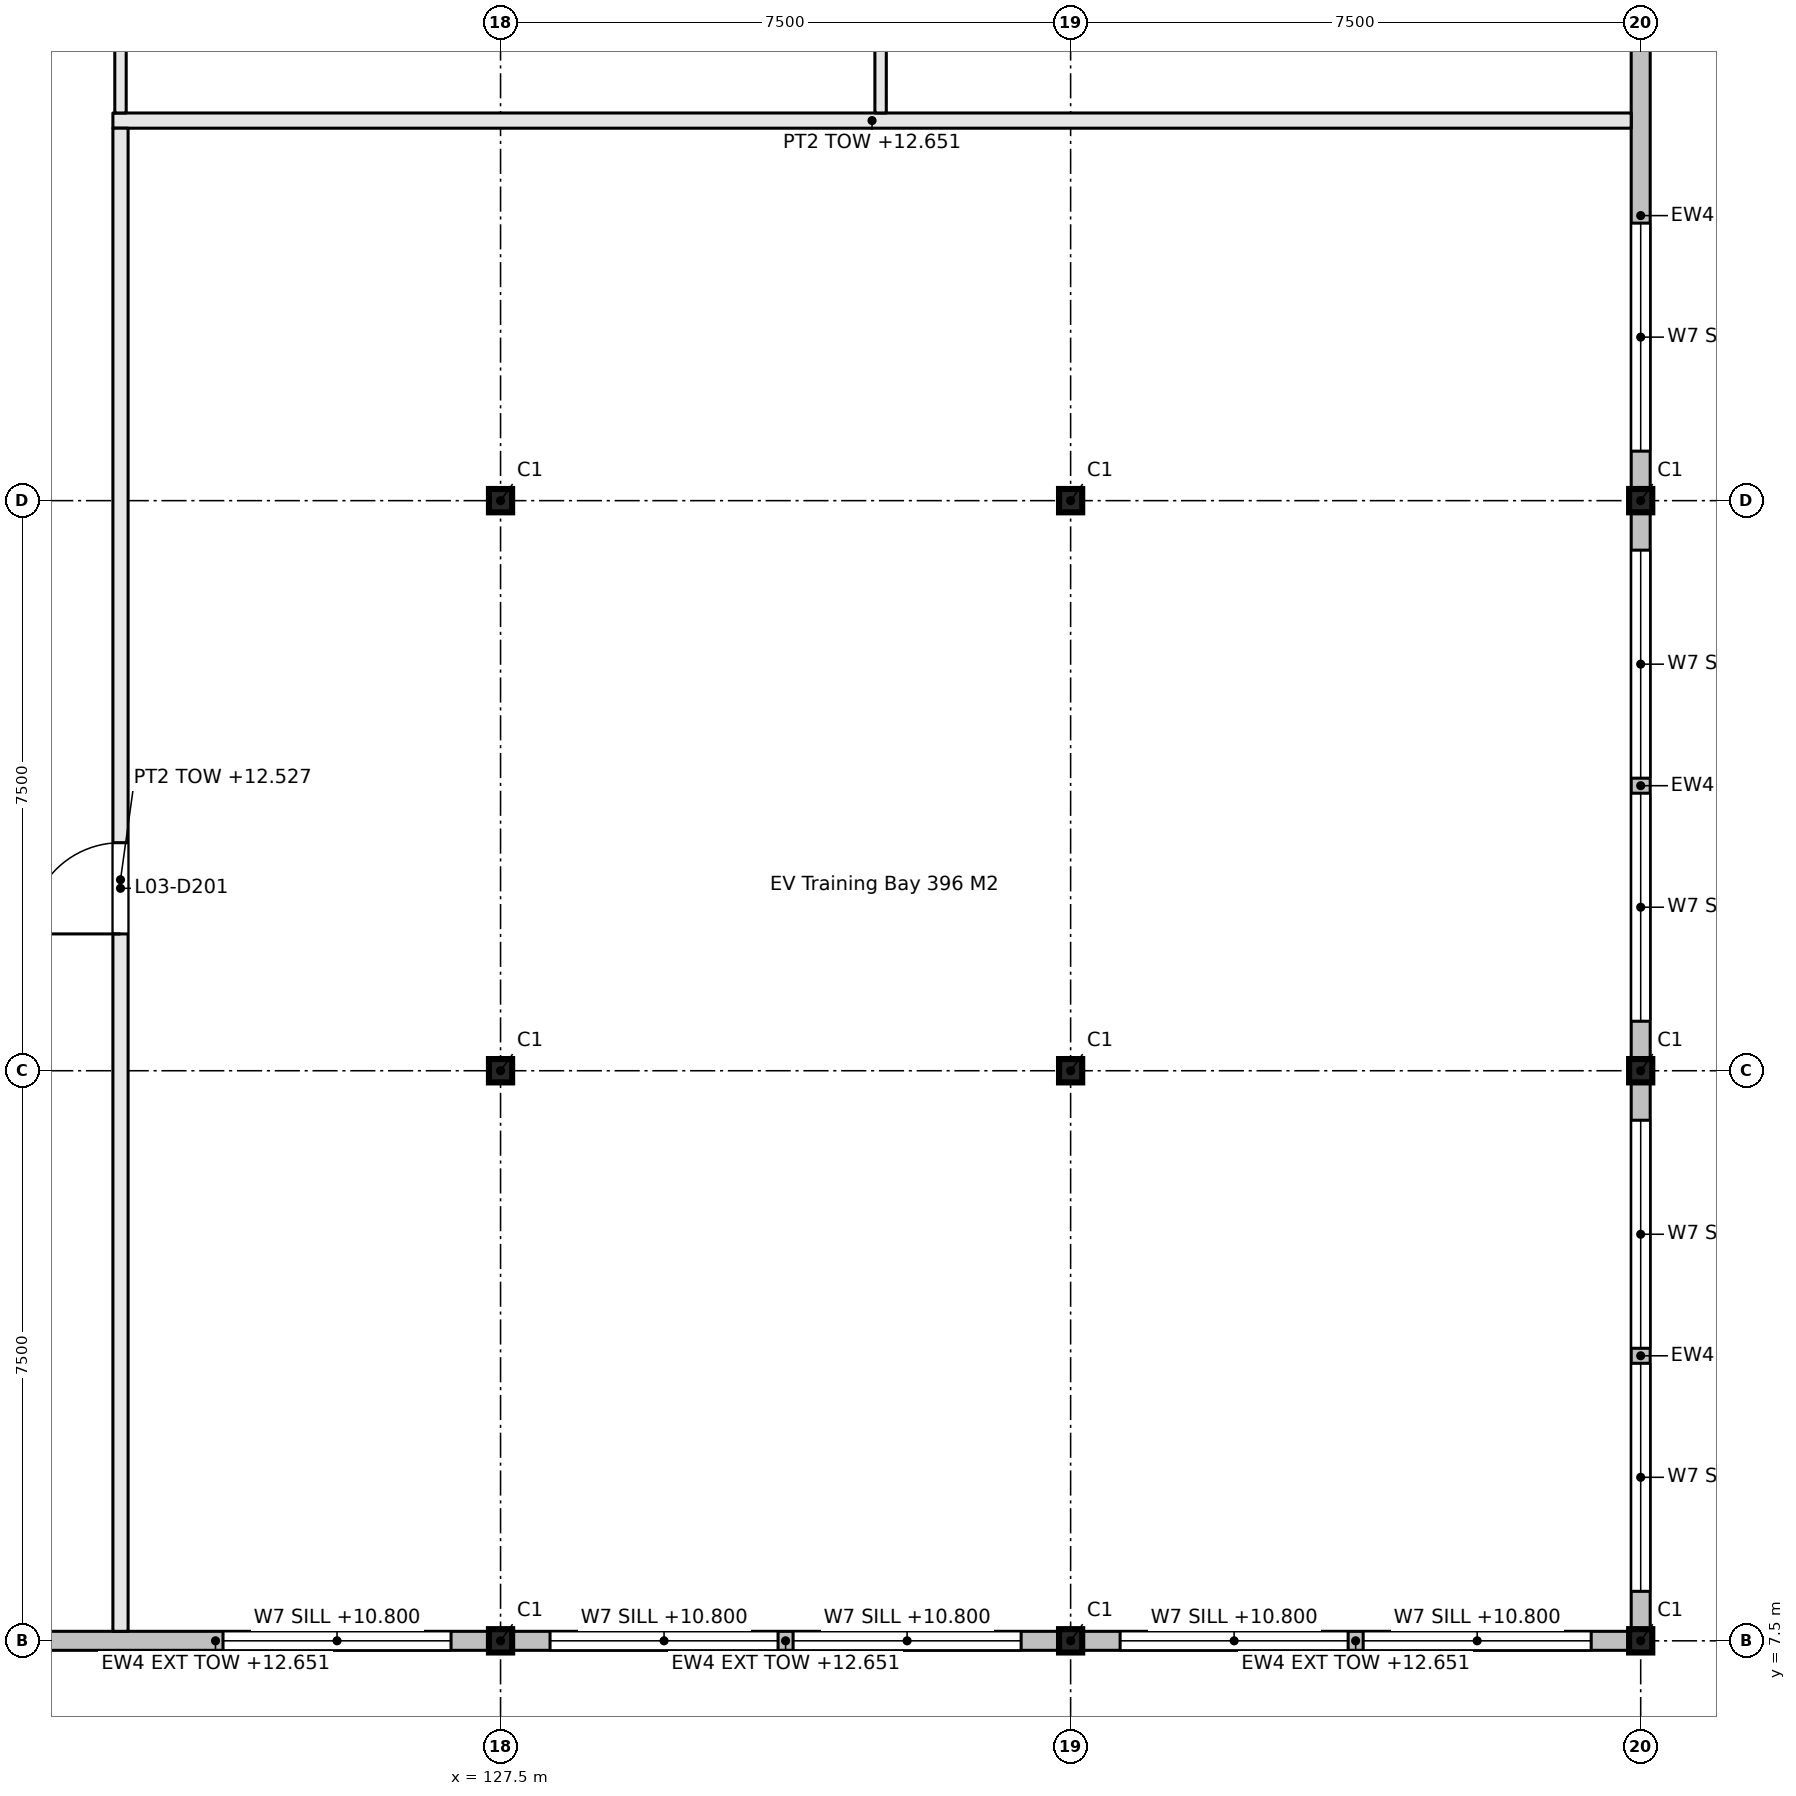
"""IFC4 building model, lengths in metres.
Left out: names, types, materials, properties, quantities, classifications, styles, units other than length and angle.
Written with IfcOpenShell. Run it as: python <this file> out.ifc"""

import sys

from ifc_helpers import new_model, si_unit, direction, frame, frame_2d, origin, origin_2d, place, context, subcontext, project, spatial, rectangle, i_section, extrude, element, fill, save


model = new_model("IFC4")
c1 = context("Model", 3, precision=1e-05, world=origin(), true_north=direction((0.0, 1.0)))
c2 = subcontext(c1, "Body", "Model", "MODEL_VIEW")
j1 = project(units=[si_unit("LENGTHUNIT", "METRE"), si_unit("PLANEANGLEUNIT", "RADIAN")], contexts=[c1])
p1 = place(None, origin())
s1 = spatial("IfcSite", under=j1, at=p1, CompositionType="ELEMENT")
p2 = place(p1, origin())
s2 = spatial("IfcBuilding", under=s1, at=p2, CompositionType="ELEMENT")
p3 = place(p2, frame((0.0, 0.0, 9.9)))
s3 = spatial("IfcBuildingStorey", under=s2, at=p3, CompositionType="ELEMENT", Elevation=9.9)
for number, where, z_axis, x_axis in (
    (1, (127.5, 7.5, 0.0), (0.0, 0.0, 1.0), (1.0, 0.0, 0.0)),
    (2, (127.5, 15.0, 0.0), (0.0, 0.0, 1.0), (1.0, 0.0, 0.0)),
    (3, (127.5, 22.5, 0.0), (0.0, 0.0, 1.0), (1.0, 0.0, 0.0)),
    (4, (135.0, 7.5, 0.0), (0.0, 0.0, 1.0), (1.0, 0.0, 0.0)),
    (5, (135.0, 15.0, 0.0), (0.0, 0.0, 1.0), (1.0, 0.0, 0.0)),
    (6, (135.0, 22.5, 0.0), (0.0, 0.0, 1.0), (1.0, 0.0, 0.0)),
    (7, (142.5, 7.5, 0.0), (0.0, 0.0, 1.0), (1.0, 0.0, 0.0)),
    (8, (142.5, 15.0, 0.0), (0.0, 0.0, 1.0), (1.0, 0.0, 0.0)),
    (9, (142.5, 22.5, 0.0), (0.0, 0.0, 1.0), (1.0, 0.0, 0.0)),
):
    element("IfcColumn", number, at=place(p3, frame(where, z_axis=z_axis, x_axis=x_axis)), inside=s3, PredefinedType="COLUMN", context=c2, shape_type="SweptSolid", body=[
        extrude(i_section(OverallWidth=0.305, OverallDepth=0.307, WebThickness=0.01, FlangeThickness=0.015, FilletRadius=0.015, at=origin_2d()), origin(), (0.0, 0.0, 1.0), 3.3),
    ])
p4 = place(p3, frame((122.4, 27.5, 0.0), z_axis=(0.0, 0.0, 1.0), x_axis=(1.0, 0.0, 0.0)))
e10 = element("IfcWall", 10, at=p4, inside=s3, PredefinedType="PARTITIONING", context=c2, shape_type="SweptSolid", body=[
    extrude(rectangle(XDim=19.975, YDim=0.2, at=frame_2d((9.988, 0.0))), origin(), (0.0, 0.0, 1.0), 2.751),
])
p5 = place(p3, frame((122.5, 7.625, 0.0), z_axis=(0.0, 0.0, 1.0), x_axis=(0.0, 1.0, 0.0)))
e11 = element("IfcWall", 11, at=p5, inside=s3, PredefinedType="PARTITIONING", context=c2, shape_type="SweptSolid", body=[
    extrude(rectangle(XDim=19.775, YDim=0.2, at=frame_2d((9.887, 0.0))), origin(), (0.0, 0.0, 1.0), 2.627),
])
p6 = place(p5, frame((9.175, 0.0, 0.0)))
e12 = element("IfcOpeningElement", 12, at=p6, cuts=e11, PredefinedType="OPENING", context=c2, shape_type="SweptSolid", body=[
    extrude(rectangle(XDim=1.2, YDim=2.1, at=frame_2d((0.6, 1.05))), frame((0.0, 0.11, 0.0), z_axis=(0.0, -1.0, 0.0), x_axis=(1.0, 0.0, 0.0)), (0.0, 0.0, 1.0), 0.22),
])
p7 = place(p3, frame((122.5, 27.6, 0.0), z_axis=(0.0, 0.0, 1.0), x_axis=(0.0, 1.0, 0.0)))
e13 = element("IfcWall", 13, at=p7, inside=s3, PredefinedType="PARTITIONING", context=c2, shape_type="SweptSolid", body=[
    extrude(rectangle(XDim=14.325, YDim=0.15, at=frame_2d((7.163, 0.0))), origin(), (0.0, 0.0, 1.0), 2.627),
])
p8 = place(p7, frame((6.55, 0.0, 0.0)))
e14 = element("IfcOpeningElement", 14, at=p8, cuts=e13, PredefinedType="OPENING", context=c2, shape_type="SweptSolid", body=[
    extrude(rectangle(XDim=1.2, YDim=2.1, at=frame_2d((0.6, 1.05))), frame((0.0, 0.085, 0.0), z_axis=(0.0, -1.0, 0.0), x_axis=(1.0, 0.0, 0.0)), (0.0, 0.0, 1.0), 0.17),
])
p9 = place(p3, frame((132.5, 27.6, 0.0), z_axis=(0.0, 0.0, 1.0), x_axis=(0.0, 1.0, 0.0)))
e15 = element("IfcWall", 15, at=p9, inside=s3, PredefinedType="PARTITIONING", context=c2, shape_type="SweptSolid", body=[
    extrude(rectangle(XDim=10.8, YDim=0.15, at=frame_2d((5.4, 0.0))), origin(), (0.0, 0.0, 1.0), 2.627),
])
p10 = place(p3, frame((120.154, 7.5, 0.0), z_axis=(0.0, 0.0, 1.0), x_axis=(1.0, 0.0, 0.0)))
e16 = element("IfcWall", 16, at=p10, inside=s3, PredefinedType="SOLIDWALL", context=c2, shape_type="SweptSolid", body=[
    extrude(rectangle(XDim=7.193, YDim=0.25, at=frame_2d((3.596, 0.0))), origin(), (0.0, 0.0, 1.0), 2.751),
])
p11 = place(p10, frame((3.695, 0.0, 0.9)))
e17 = element("IfcOpeningElement", 17, at=p11, cuts=e16, PredefinedType="OPENING", context=c2, shape_type="SweptSolid", body=[
    extrude(rectangle(XDim=3.0, YDim=1.5, at=frame_2d((1.5, 0.75))), frame((0.0, 0.135, 0.0), z_axis=(0.0, -1.0, 0.0), x_axis=(1.0, 0.0, 0.0)), (0.0, 0.0, 1.0), 0.27),
])
p12 = place(p3, frame((127.654, 7.5, 0.0), z_axis=(0.0, 0.0, 1.0), x_axis=(1.0, 0.0, 0.0)))
e18 = element("IfcWall", 18, at=p12, inside=s3, PredefinedType="SOLIDWALL", context=c2, shape_type="SweptSolid", body=[
    extrude(rectangle(XDim=7.193, YDim=0.25, at=frame_2d((3.596, 0.0))), origin(), (0.0, 0.0, 1.0), 2.751),
])
p13 = place(p12, frame((0.498, 0.0, 0.9)))
e19 = element("IfcOpeningElement", 19, at=p13, cuts=e18, PredefinedType="OPENING", context=c2, shape_type="SweptSolid", body=[
    extrude(rectangle(XDim=3.0, YDim=1.5, at=frame_2d((1.5, 0.75))), frame((0.0, 0.135, 0.0), z_axis=(0.0, -1.0, 0.0), x_axis=(1.0, 0.0, 0.0)), (0.0, 0.0, 1.0), 0.27),
])
p14 = place(p12, frame((3.695, 0.0, 0.9)))
e20 = element("IfcOpeningElement", 20, at=p14, cuts=e18, PredefinedType="OPENING", context=c2, shape_type="SweptSolid", body=[
    extrude(rectangle(XDim=3.0, YDim=1.5, at=frame_2d((1.5, 0.75))), frame((0.0, 0.135, 0.0), z_axis=(0.0, -1.0, 0.0), x_axis=(1.0, 0.0, 0.0)), (0.0, 0.0, 1.0), 0.27),
])
p15 = place(p3, frame((135.154, 7.5, 0.0), z_axis=(0.0, 0.0, 1.0), x_axis=(1.0, 0.0, 0.0)))
e21 = element("IfcWall", 21, at=p15, inside=s3, PredefinedType="SOLIDWALL", context=c2, shape_type="SweptSolid", body=[
    extrude(rectangle(XDim=7.193, YDim=0.25, at=frame_2d((3.596, 0.0))), origin(), (0.0, 0.0, 1.0), 2.751),
])
p16 = place(p15, frame((0.498, 0.0, 0.9)))
e22 = element("IfcOpeningElement", 22, at=p16, cuts=e21, PredefinedType="OPENING", context=c2, shape_type="SweptSolid", body=[
    extrude(rectangle(XDim=3.0, YDim=1.5, at=frame_2d((1.5, 0.75))), frame((0.0, 0.135, 0.0), z_axis=(0.0, -1.0, 0.0), x_axis=(1.0, 0.0, 0.0)), (0.0, 0.0, 1.0), 0.27),
])
p17 = place(p15, frame((3.695, 0.0, 0.9)))
e23 = element("IfcOpeningElement", 23, at=p17, cuts=e21, PredefinedType="OPENING", context=c2, shape_type="SweptSolid", body=[
    extrude(rectangle(XDim=3.0, YDim=1.5, at=frame_2d((1.5, 0.75))), frame((0.0, 0.135, 0.0), z_axis=(0.0, -1.0, 0.0), x_axis=(1.0, 0.0, 0.0)), (0.0, 0.0, 1.0), 0.27),
])
p18 = place(p3, frame((142.5, 7.654, 0.0), z_axis=(0.0, 0.0, 1.0), x_axis=(0.0, 1.0, 0.0)))
e24 = element("IfcWall", 24, at=p18, inside=s3, PredefinedType="SOLIDWALL", context=c2, shape_type="SweptSolid", body=[
    extrude(rectangle(XDim=7.193, YDim=0.25, at=frame_2d((3.596, 0.0))), origin(), (0.0, 0.0, 1.0), 2.751),
])
p19 = place(p18, frame((0.498, 0.0, 0.9)))
e25 = element("IfcOpeningElement", 25, at=p19, cuts=e24, PredefinedType="OPENING", context=c2, shape_type="SweptSolid", body=[
    extrude(rectangle(XDim=3.0, YDim=1.5, at=frame_2d((1.5, 0.75))), frame((0.0, 0.135, 0.0), z_axis=(0.0, -1.0, 0.0), x_axis=(1.0, 0.0, 0.0)), (0.0, 0.0, 1.0), 0.27),
])
p20 = place(p18, frame((3.695, 0.0, 0.9)))
e26 = element("IfcOpeningElement", 26, at=p20, cuts=e24, PredefinedType="OPENING", context=c2, shape_type="SweptSolid", body=[
    extrude(rectangle(XDim=3.0, YDim=1.5, at=frame_2d((1.5, 0.75))), frame((0.0, 0.135, 0.0), z_axis=(0.0, -1.0, 0.0), x_axis=(1.0, 0.0, 0.0)), (0.0, 0.0, 1.0), 0.27),
])
p21 = place(p3, frame((142.5, 15.154, 0.0), z_axis=(0.0, 0.0, 1.0), x_axis=(0.0, 1.0, 0.0)))
e27 = element("IfcWall", 27, at=p21, inside=s3, PredefinedType="SOLIDWALL", context=c2, shape_type="SweptSolid", body=[
    extrude(rectangle(XDim=7.193, YDim=0.25, at=frame_2d((3.596, 0.0))), origin(), (0.0, 0.0, 1.0), 2.751),
])
p22 = place(p21, frame((0.498, 0.0, 0.9)))
e28 = element("IfcOpeningElement", 28, at=p22, cuts=e27, PredefinedType="OPENING", context=c2, shape_type="SweptSolid", body=[
    extrude(rectangle(XDim=3.0, YDim=1.5, at=frame_2d((1.5, 0.75))), frame((0.0, 0.135, 0.0), z_axis=(0.0, -1.0, 0.0), x_axis=(1.0, 0.0, 0.0)), (0.0, 0.0, 1.0), 0.27),
])
p23 = place(p21, frame((3.695, 0.0, 0.9)))
e29 = element("IfcOpeningElement", 29, at=p23, cuts=e27, PredefinedType="OPENING", context=c2, shape_type="SweptSolid", body=[
    extrude(rectangle(XDim=3.0, YDim=1.5, at=frame_2d((1.5, 0.75))), frame((0.0, 0.135, 0.0), z_axis=(0.0, -1.0, 0.0), x_axis=(1.0, 0.0, 0.0)), (0.0, 0.0, 1.0), 0.27),
])
p24 = place(p3, frame((142.5, 22.654, 0.0), z_axis=(0.0, 0.0, 1.0), x_axis=(0.0, 1.0, 0.0)))
e30 = element("IfcWall", 30, at=p24, inside=s3, PredefinedType="SOLIDWALL", context=c2, shape_type="SweptSolid", body=[
    extrude(rectangle(XDim=7.193, YDim=0.25, at=frame_2d((3.596, 0.0))), origin(), (0.0, 0.0, 1.0), 2.751),
])
p25 = place(p24, frame((0.498, 0.0, 0.9)))
e31 = element("IfcOpeningElement", 31, at=p25, cuts=e30, PredefinedType="OPENING", context=c2, shape_type="SweptSolid", body=[
    extrude(rectangle(XDim=3.0, YDim=1.5, at=frame_2d((1.5, 0.75))), frame((0.0, 0.135, 0.0), z_axis=(0.0, -1.0, 0.0), x_axis=(1.0, 0.0, 0.0)), (0.0, 0.0, 1.0), 0.27),
])
p26 = place(p6, origin())
e32 = element("IfcDoor", 32, at=p26, inside=s3, OperationType="DOUBLE_DOOR_SINGLE_SWING", PredefinedType="DOOR", context=c2, shape_type="SweptSolid", body=[
    extrude(rectangle(XDim=1.2, YDim=2.1, at=frame_2d((0.6, 1.05))), frame((0.0, 0.025, 0.0), z_axis=(0.0, -1.0, 0.0), x_axis=(1.0, 0.0, 0.0)), (0.0, 0.0, 1.0), 0.05),
])
fill(e12, e32)
p27 = place(p11, origin())
e33 = element("IfcWindow", 33, at=p27, inside=s3, PartitioningType="TRIPLE_PANEL_VERTICAL", PredefinedType="WINDOW", context=c2, shape_type="SweptSolid", body=[
    extrude(rectangle(XDim=3.0, YDim=1.5, at=frame_2d((1.5, 0.75))), frame((0.0, 0.03, 0.0), z_axis=(0.0, -1.0, 0.0), x_axis=(1.0, 0.0, 0.0)), (0.0, 0.0, 1.0), 0.06),
])
fill(e17, e33)
p28 = place(p13, origin())
e34 = element("IfcWindow", 34, at=p28, inside=s3, PartitioningType="TRIPLE_PANEL_VERTICAL", PredefinedType="WINDOW", context=c2, shape_type="SweptSolid", body=[
    extrude(rectangle(XDim=3.0, YDim=1.5, at=frame_2d((1.5, 0.75))), frame((0.0, 0.03, 0.0), z_axis=(0.0, -1.0, 0.0), x_axis=(1.0, 0.0, 0.0)), (0.0, 0.0, 1.0), 0.06),
])
fill(e19, e34)
p29 = place(p14, origin())
e35 = element("IfcWindow", 35, at=p29, inside=s3, PartitioningType="TRIPLE_PANEL_VERTICAL", PredefinedType="WINDOW", context=c2, shape_type="SweptSolid", body=[
    extrude(rectangle(XDim=3.0, YDim=1.5, at=frame_2d((1.5, 0.75))), frame((0.0, 0.03, 0.0), z_axis=(0.0, -1.0, 0.0), x_axis=(1.0, 0.0, 0.0)), (0.0, 0.0, 1.0), 0.06),
])
fill(e20, e35)
p30 = place(p16, origin())
e36 = element("IfcWindow", 36, at=p30, inside=s3, PartitioningType="TRIPLE_PANEL_VERTICAL", PredefinedType="WINDOW", context=c2, shape_type="SweptSolid", body=[
    extrude(rectangle(XDim=3.0, YDim=1.5, at=frame_2d((1.5, 0.75))), frame((0.0, 0.03, 0.0), z_axis=(0.0, -1.0, 0.0), x_axis=(1.0, 0.0, 0.0)), (0.0, 0.0, 1.0), 0.06),
])
fill(e22, e36)
p31 = place(p17, origin())
e37 = element("IfcWindow", 37, at=p31, inside=s3, PartitioningType="TRIPLE_PANEL_VERTICAL", PredefinedType="WINDOW", context=c2, shape_type="SweptSolid", body=[
    extrude(rectangle(XDim=3.0, YDim=1.5, at=frame_2d((1.5, 0.75))), frame((0.0, 0.03, 0.0), z_axis=(0.0, -1.0, 0.0), x_axis=(1.0, 0.0, 0.0)), (0.0, 0.0, 1.0), 0.06),
])
fill(e23, e37)
p32 = place(p19, origin())
e38 = element("IfcWindow", 38, at=p32, inside=s3, PartitioningType="TRIPLE_PANEL_VERTICAL", PredefinedType="WINDOW", context=c2, shape_type="SweptSolid", body=[
    extrude(rectangle(XDim=3.0, YDim=1.5, at=frame_2d((1.5, 0.75))), frame((0.0, 0.03, 0.0), z_axis=(0.0, -1.0, 0.0), x_axis=(1.0, 0.0, 0.0)), (0.0, 0.0, 1.0), 0.06),
])
fill(e25, e38)
p33 = place(p20, origin())
e39 = element("IfcWindow", 39, at=p33, inside=s3, PartitioningType="TRIPLE_PANEL_VERTICAL", PredefinedType="WINDOW", context=c2, shape_type="SweptSolid", body=[
    extrude(rectangle(XDim=3.0, YDim=1.5, at=frame_2d((1.5, 0.75))), frame((0.0, 0.03, 0.0), z_axis=(0.0, -1.0, 0.0), x_axis=(1.0, 0.0, 0.0)), (0.0, 0.0, 1.0), 0.06),
])
fill(e26, e39)
p34 = place(p22, origin())
e40 = element("IfcWindow", 40, at=p34, inside=s3, PartitioningType="TRIPLE_PANEL_VERTICAL", PredefinedType="WINDOW", context=c2, shape_type="SweptSolid", body=[
    extrude(rectangle(XDim=3.0, YDim=1.5, at=frame_2d((1.5, 0.75))), frame((0.0, 0.03, 0.0), z_axis=(0.0, -1.0, 0.0), x_axis=(1.0, 0.0, 0.0)), (0.0, 0.0, 1.0), 0.06),
])
fill(e28, e40)
p35 = place(p23, origin())
e41 = element("IfcWindow", 41, at=p35, inside=s3, PartitioningType="TRIPLE_PANEL_VERTICAL", PredefinedType="WINDOW", context=c2, shape_type="SweptSolid", body=[
    extrude(rectangle(XDim=3.0, YDim=1.5, at=frame_2d((1.5, 0.75))), frame((0.0, 0.03, 0.0), z_axis=(0.0, -1.0, 0.0), x_axis=(1.0, 0.0, 0.0)), (0.0, 0.0, 1.0), 0.06),
])
fill(e29, e41)
p36 = place(p25, origin())
e42 = element("IfcWindow", 42, at=p36, inside=s3, PartitioningType="TRIPLE_PANEL_VERTICAL", PredefinedType="WINDOW", context=c2, shape_type="SweptSolid", body=[
    extrude(rectangle(XDim=3.0, YDim=1.5, at=frame_2d((1.5, 0.75))), frame((0.0, 0.03, 0.0), z_axis=(0.0, -1.0, 0.0), x_axis=(1.0, 0.0, 0.0)), (0.0, 0.0, 1.0), 0.06),
])
fill(e31, e42)
save(model, sys.argv[1])
